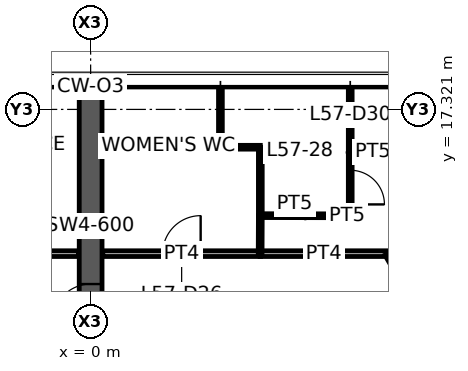
"""IFC4 building model, lengths in metres.
Left out: names, types, materials, properties, quantities, classifications, styles, units other than length and angle.
Written with IfcOpenShell. Run it as: python <this file> out.ifc"""

import sys

from ifc_helpers import new_model, si_unit, direction, frame, frame_2d, origin, place, context, subcontext, project, spatial, rectangle, extrude, element, fill, save


model = new_model("IFC4")
c1 = context("Model", 3, precision=1e-05, world=origin(), true_north=direction((0.0, 1.0)))
c2 = subcontext(c1, "Body", "Model", "MODEL_VIEW")
j1 = project(units=[si_unit("LENGTHUNIT", "METRE"), si_unit("PLANEANGLEUNIT", "RADIAN")], contexts=[c1])
p1 = place(None, origin())
s1 = spatial("IfcSite", under=j1, at=p1, CompositionType="ELEMENT")
p2 = place(p1, origin())
s2 = spatial("IfcBuilding", under=s1, at=p2, CompositionType="ELEMENT")
p3 = place(p2, frame((0.0, 0.0, 228.4)))
s3 = spatial("IfcBuildingStorey", under=s2, at=p3, CompositionType="ELEMENT", Elevation=228.4)
p4 = place(p3, frame((0.0, 10.725, 0.0), z_axis=(0.0, 0.0, 1.0), x_axis=(0.0, 1.0, 0.0)))
e1 = element("IfcWall", 1, at=p4, inside=s3, PredefinedType="SHEAR", context=c2, shape_type="SweptSolid", body=[
    extrude(rectangle(XDim=7.045, YDim=0.6, at=frame_2d((3.523, 0.0))), origin(), (0.0, 0.0, 1.0), 3.9),
])
p5 = place(p4, frame((1.0, 0.0, 0.0)))
e2 = element("IfcOpeningElement", 2, at=p5, cuts=e1, PredefinedType="OPENING", context=c2, shape_type="SweptSolid", body=[
    extrude(rectangle(XDim=1.0, YDim=2.1, at=frame_2d((0.5, 1.05))), frame((0.0, 0.31, 0.0), z_axis=(0.0, -1.0, 0.0), x_axis=(1.0, 0.0, 0.0)), (0.0, 0.0, 1.0), 0.62),
])
p6 = place(p3, frame((0.32, 13.525, 0.0), z_axis=(0.0, 0.0, 1.0), x_axis=(1.0, 0.0, 0.0)))
e3 = element("IfcWall", 3, at=p6, inside=s3, PredefinedType="PARTITIONING", context=c2, shape_type="SweptSolid", body=[
    extrude(rectangle(XDim=4.15, YDim=0.15, at=frame_2d((2.075, 0.0))), origin(), (0.0, 0.0, 1.0), 2.95),
])
p7 = place(p6, frame((1.575, 0.0, 0.0)))
e4 = element("IfcOpeningElement", 4, at=p7, cuts=e3, PredefinedType="OPENING", context=c2, shape_type="SweptSolid", body=[
    extrude(rectangle(XDim=1.0, YDim=2.1, at=frame_2d((0.5, 1.05))), frame((0.0, 0.085, 0.0), z_axis=(0.0, -1.0, 0.0), x_axis=(1.0, 0.0, 0.0)), (0.0, 0.0, 1.0), 0.17),
])
p8 = place(p3, frame((4.46, 13.525, 0.0), z_axis=(0.0, 0.0, 1.0), x_axis=(1.0, 0.0, 0.0)))
e5 = element("IfcWall", 5, at=p8, inside=s3, PredefinedType="PARTITIONING", context=c2, shape_type="SweptSolid", body=[
    extrude(rectangle(XDim=3.348, YDim=0.15, at=frame_2d((1.674, 0.0))), origin(), (0.0, 0.0, 1.0), 2.95),
])
p9 = place(p3, frame((7.809, 13.525, 0.0), z_axis=(0.0, 0.0, 1.0), x_axis=(0.500001088571, -0.866024775297, 0.0)))
e6 = element("IfcWall", 6, at=p9, inside=s3, PredefinedType="PARTITIONING", context=c2, shape_type="SweptSolid", body=[
    extrude(rectangle(XDim=3.413, YDim=0.15, at=frame_2d((1.707, 0.0))), origin(), (0.0, 0.0, 1.0), 2.95),
])
p10 = place(p3, frame((3.415, 16.325, 0.0), z_axis=(0.0, 0.0, 1.0), x_axis=(1.0, 0.0, 0.0)))
e7 = element("IfcWall", 7, at=p10, inside=s3, PredefinedType="PARTITIONING", context=c2, shape_type="SweptSolid", body=[
    extrude(rectangle(XDim=1.05, YDim=0.1, at=frame_2d((0.525, 0.0))), origin(), (0.0, 0.0, 1.0), 2.95),
])
p11 = place(p3, frame((3.415, 17.801, 0.0), z_axis=(0.0, 0.0, 1.0), x_axis=(0.0, -1.0, 0.0)))
e8 = element("IfcWall", 8, at=p11, inside=s3, PredefinedType="PARTITIONING", context=c2, shape_type="SweptSolid", body=[
    extrude(rectangle(XDim=1.476, YDim=0.1, at=frame_2d((0.738, 0.0))), origin(), (0.0, 0.0, 1.0), 2.95),
])
p12 = place(p3, frame((4.465, 16.325, 0.0), z_axis=(0.0, 0.0, 1.0), x_axis=(0.0, -1.0, 0.0)))
e9 = element("IfcWall", 9, at=p12, inside=s3, PredefinedType="PARTITIONING", context=c2, shape_type="SweptSolid", body=[
    extrude(rectangle(XDim=1.81, YDim=0.1, at=frame_2d((0.905, 0.0))), origin(), (0.0, 0.0, 1.0), 2.95),
])
p13 = place(p3, frame((4.465, 14.525, 0.0), z_axis=(0.0, 0.0, 1.0), x_axis=(-0.00463862197, -0.999989241535, 0.0)))
e10 = element("IfcWall", 10, at=p13, inside=s3, PredefinedType="PARTITIONING", context=c2, shape_type="SweptSolid", body=[
    extrude(rectangle(XDim=1.0, YDim=0.1, at=frame_2d((0.5, 0.0))), origin(), (0.0, 0.0, 1.0), 2.95),
])
p14 = place(p3, frame((6.831, 14.521, 0.0), z_axis=(0.0, 0.0, 1.0), x_axis=(-0.999998274693, 0.001857581934, 0.0)))
e11 = element("IfcWall", 11, at=p14, inside=s3, PredefinedType="PARTITIONING", context=c2, shape_type="SweptSolid", body=[
    extrude(rectangle(XDim=2.366, YDim=0.1, at=frame_2d((1.183, 0.0))), origin(), (0.0, 0.0, 1.0), 2.95),
])
p15 = place(p3, frame((6.831, 17.855, 0.0), z_axis=(0.0, 0.0, 1.0), x_axis=(0.0, -1.0, 0.0)))
e12 = element("IfcWall", 12, at=p15, inside=s3, PredefinedType="PARTITIONING", context=c2, shape_type="SweptSolid", body=[
    extrude(rectangle(XDim=3.335, YDim=0.1, at=frame_2d((1.667, 0.0))), origin(), (0.0, 0.0, 1.0), 2.95),
])
p16 = place(p15, frame((2.135, 0.0, 0.0)))
e13 = element("IfcOpeningElement", 13, at=p16, cuts=e12, PredefinedType="OPENING", context=c2, shape_type="SweptSolid", body=[
    extrude(rectangle(XDim=0.9, YDim=2.1, at=frame_2d((0.45, 1.05))), frame((0.0, 0.06, 0.0), z_axis=(0.0, -1.0, 0.0), x_axis=(1.0, 0.0, 0.0)), (0.0, 0.0, 1.0), 0.12),
])
p17 = place(p3, frame((-7.786, 13.525, 0.0), z_axis=(0.0, 0.0, 1.0), x_axis=(1.0, 0.0, 0.0)))
e14 = element("IfcWall", 14, at=p17, inside=s3, PredefinedType="PARTITIONING", context=c2, shape_type="SweptSolid", body=[
    extrude(rectangle(XDim=7.466, YDim=0.15, at=frame_2d((3.733, 0.0))), origin(), (0.0, 0.0, 1.0), 2.95),
])
p18 = place(p17, frame((3.233, 0.0, 0.0)))
e15 = element("IfcOpeningElement", 15, at=p18, cuts=e14, PredefinedType="OPENING", context=c2, shape_type="SweptSolid", body=[
    extrude(rectangle(XDim=1.0, YDim=2.1, at=frame_2d((0.5, 1.05))), frame((0.0, 0.085, 0.0), z_axis=(0.0, -1.0, 0.0), x_axis=(1.0, 0.0, 0.0)), (0.0, 0.0, 1.0), 0.17),
])
p19 = place(p3, frame((0.0, 17.771, 0.0), z_axis=(0.0, 0.0, 1.0), x_axis=(0.0, 1.0, 0.0)))
e16 = element("IfcWall", 16, at=p19, inside=s3, PredefinedType="PARTITIONING", context=c2, shape_type="SweptSolid", body=[
    extrude(rectangle(XDim=0.085, YDim=0.175, at=frame_2d((0.042, 0.0))), origin(), (0.0, 0.0, 1.0), 3.9),
])
p20 = place(p5, origin())
e17 = element("IfcDoor", 17, at=p20, inside=s3, OperationType="SINGLE_SWING_LEFT", PredefinedType="DOOR", context=c2, shape_type="SweptSolid", body=[
    extrude(rectangle(XDim=1.0, YDim=2.1, at=frame_2d((0.5, 1.05))), frame((0.0, 0.025, 0.0), z_axis=(0.0, -1.0, 0.0), x_axis=(1.0, 0.0, 0.0)), (0.0, 0.0, 1.0), 0.05),
])
fill(e2, e17)
p21 = place(p7, origin())
e18 = element("IfcDoor", 18, at=p21, inside=s3, OperationType="SINGLE_SWING_RIGHT", PredefinedType="DOOR", context=c2, shape_type="SweptSolid", body=[
    extrude(rectangle(XDim=1.0, YDim=2.1, at=frame_2d((0.5, 1.05))), frame((0.0, 0.025, 0.0), z_axis=(0.0, -1.0, 0.0), x_axis=(1.0, 0.0, 0.0)), (0.0, 0.0, 1.0), 0.05),
])
fill(e4, e18)
p22 = place(p16, origin())
e19 = element("IfcDoor", 19, at=p22, inside=s3, OperationType="SINGLE_SWING_RIGHT", PredefinedType="DOOR", context=c2, shape_type="SweptSolid", body=[
    extrude(rectangle(XDim=0.9, YDim=2.1, at=frame_2d((0.45, 1.05))), frame((0.0, 0.025, 0.0), z_axis=(0.0, -1.0, 0.0), x_axis=(1.0, 0.0, 0.0)), (0.0, 0.0, 1.0), 0.05),
])
fill(e13, e19)
save(model, sys.argv[1])
